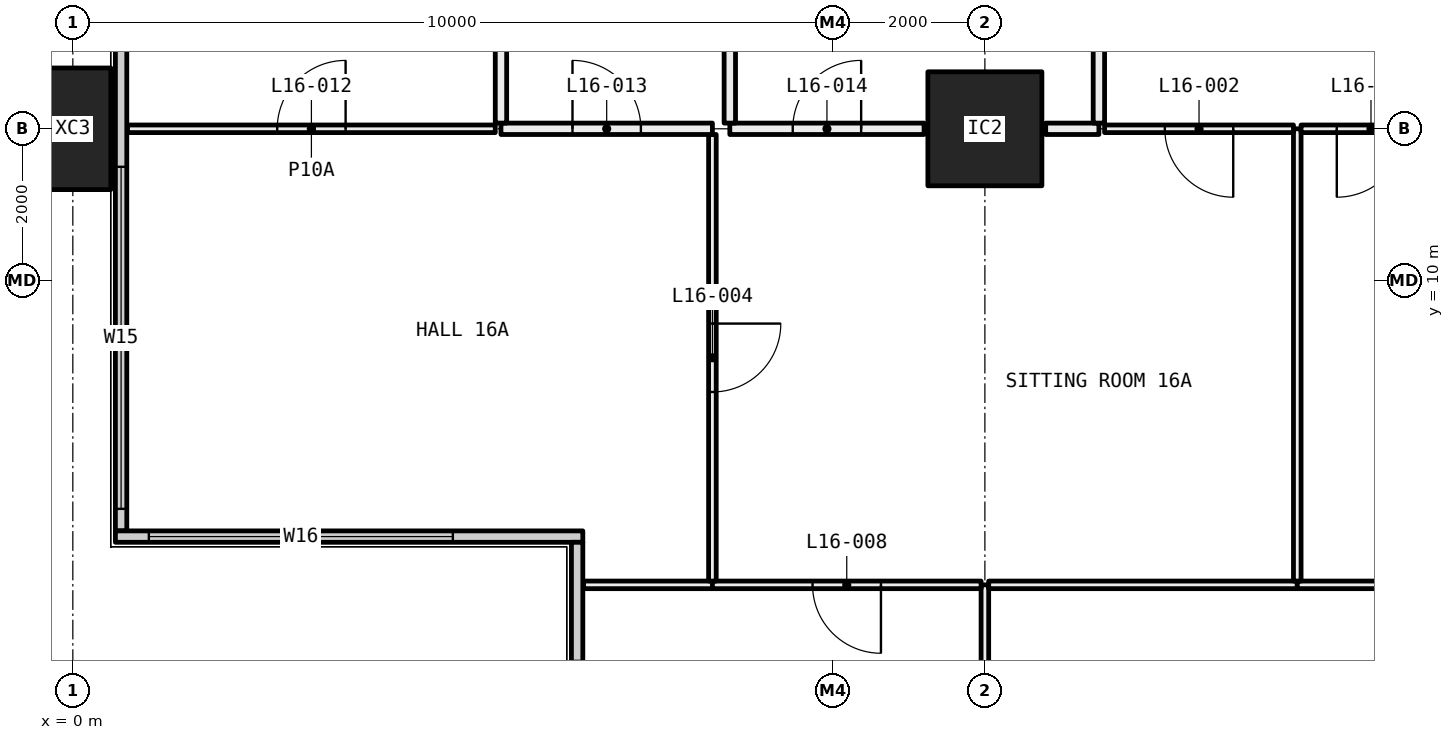
"""IFC4 building model, lengths in metres.
Left out: names, types, materials, properties, quantities, classifications, styles, units other than length and angle.
Written with IfcOpenShell. Run it as: python <this file> out.ifc"""

import sys

from ifc_helpers import new_model, si_unit, direction, frame, frame_2d, origin, origin_2d, place, context, subcontext, project, spatial, rectangle, hollow_rectangle, extrude, element, fill, save


model = new_model("IFC4")
c1 = context("Model", 3, precision=1e-05, world=origin(), true_north=direction((0.0, 1.0)))
c2 = subcontext(c1, "Body", "Model", "MODEL_VIEW")
j1 = project(units=[si_unit("LENGTHUNIT", "METRE"), si_unit("PLANEANGLEUNIT", "RADIAN")], contexts=[c1])
p1 = place(None, origin())
s1 = spatial("IfcSite", under=j1, at=p1, CompositionType="ELEMENT")
p2 = place(p1, origin())
s2 = spatial("IfcBuilding", under=s1, at=p2, CompositionType="ELEMENT")
p3 = place(p2, frame((0.0, 0.0, 67.95)))
s3 = spatial("IfcBuildingStorey", under=s2, at=p3, CompositionType="ELEMENT", Elevation=67.95)
p4 = place(p3, frame((0.0, 12.0, -0.4), z_axis=(0.0, 0.0, 1.0), x_axis=(0.0, 1.0, 0.0)))
e1 = element("IfcColumn", 1, at=p4, inside=s3, PredefinedType="COLUMN", context=c2, shape_type="SweptSolid", body=[
    extrude(hollow_rectangle(XDim=1.6, YDim=1.0, WallThickness=0.065, at=origin_2d()), origin(), (0.0, 0.0, 1.0), 3.45),
])
p5 = place(p3, frame((12.0, 12.0, 0.0), z_axis=(0.0, 0.0, 1.0), x_axis=(1.0, 0.0, 0.0)))
e2 = element("IfcColumn", 2, at=p5, inside=s3, PredefinedType="COLUMN", context=c2, shape_type="SweptSolid", body=[
    extrude(hollow_rectangle(XDim=1.5, YDim=1.5, WallThickness=0.065, at=origin_2d()), origin(), (0.0, 0.0, 1.0), 3.05),
])
p6 = place(p3, frame((0.635, 6.71, 0.0), z_axis=(0.0, 0.0, 1.0), x_axis=(0.0, 1.0, 0.0)))
e3 = element("IfcWall", 3, at=p6, inside=s3, PredefinedType="ELEMENTEDWALL", context=c2, shape_type="SweptSolid", body=[
    extrude(rectangle(XDim=34.58, YDim=0.15, at=frame_2d((17.29, 0.0))), origin(), (0.0, 0.0, 1.0), 3.05),
])
p7 = place(p6, frame((0.29, 0.0, 0.45)))
e4 = element("IfcOpeningElement", 4, at=p7, cuts=e3, PredefinedType="OPENING", context=c2, shape_type="SweptSolid", body=[
    extrude(rectangle(XDim=4.5, YDim=2.55, at=frame_2d((2.25, 1.275))), frame((0.0, 0.085, 0.0), z_axis=(0.0, -1.0, 0.0), x_axis=(1.0, 0.0, 0.0)), (0.0, 0.0, 1.0), 0.17),
])
p8 = place(p6, frame((7.54, 0.0, 0.45)))
e5 = element("IfcOpeningElement", 5, at=p8, cuts=e3, PredefinedType="OPENING", context=c2, shape_type="SweptSolid", body=[
    extrude(rectangle(XDim=3.25, YDim=2.55, at=frame_2d((1.625, 1.275))), frame((0.0, 0.085, 0.0), z_axis=(0.0, -1.0, 0.0), x_axis=(1.0, 0.0, 0.0)), (0.0, 0.0, 1.0), 0.17),
])
p9 = place(p6, frame((11.79, 0.0, 0.45)))
e6 = element("IfcOpeningElement", 6, at=p9, cuts=e3, PredefinedType="OPENING", context=c2, shape_type="SweptSolid", body=[
    extrude(rectangle(XDim=3.25, YDim=2.55, at=frame_2d((1.625, 1.275))), frame((0.0, 0.085, 0.0), z_axis=(0.0, -1.0, 0.0), x_axis=(1.0, 0.0, 0.0)), (0.0, 0.0, 1.0), 0.17),
])
p10 = place(p6, frame((19.54, 0.0, 0.45)))
e7 = element("IfcOpeningElement", 7, at=p10, cuts=e3, PredefinedType="OPENING", context=c2, shape_type="SweptSolid", body=[
    extrude(rectangle(XDim=3.25, YDim=2.55, at=frame_2d((1.625, 1.275))), frame((0.0, 0.085, 0.0), z_axis=(0.0, -1.0, 0.0), x_axis=(1.0, 0.0, 0.0)), (0.0, 0.0, 1.0), 0.17),
])
p11 = place(p6, frame((23.79, 0.0, 0.45)))
e8 = element("IfcOpeningElement", 8, at=p11, cuts=e3, PredefinedType="OPENING", context=c2, shape_type="SweptSolid", body=[
    extrude(rectangle(XDim=2.0, YDim=2.55, at=frame_2d((1.0, 1.275))), frame((0.0, 0.085, 0.0), z_axis=(0.0, -1.0, 0.0), x_axis=(1.0, 0.0, 0.0)), (0.0, 0.0, 1.0), 0.17),
])
p12 = place(p6, frame((29.79, 0.0, 0.45)))
e9 = element("IfcOpeningElement", 9, at=p12, cuts=e3, PredefinedType="OPENING", context=c2, shape_type="SweptSolid", body=[
    extrude(rectangle(XDim=4.5, YDim=2.55, at=frame_2d((2.25, 1.275))), frame((0.0, 0.085, 0.0), z_axis=(0.0, -1.0, 0.0), x_axis=(1.0, 0.0, 0.0)), (0.0, 0.0, 1.0), 0.17),
])
p13 = place(p3, frame((0.56, 6.635, 0.0), z_axis=(0.0, 0.0, 1.0), x_axis=(1.0, 0.0, 0.0)))
e10 = element("IfcWall", 10, at=p13, inside=s3, PredefinedType="ELEMENTEDWALL", context=c2, shape_type="SweptSolid", body=[
    extrude(rectangle(XDim=6.15, YDim=0.15, at=frame_2d((3.075, 0.0))), origin(), (0.0, 0.0, 1.0), 3.05),
])
p14 = place(p13, frame((0.44, 0.0, 0.45)))
e11 = element("IfcOpeningElement", 11, at=p14, cuts=e10, PredefinedType="OPENING", context=c2, shape_type="SweptSolid", body=[
    extrude(rectangle(XDim=4.0, YDim=2.55, at=frame_2d((2.0, 1.275))), frame((0.0, 0.085, 0.0), z_axis=(0.0, -1.0, 0.0), x_axis=(1.0, 0.0, 0.0)), (0.0, 0.0, 1.0), 0.17),
])
p15 = place(p3, frame((6.635, 0.71, 0.0), z_axis=(0.0, 0.0, 1.0), x_axis=(0.0, 1.0, 0.0)))
e12 = element("IfcWall", 12, at=p15, inside=s3, PredefinedType="ELEMENTEDWALL", context=c2, shape_type="SweptSolid", body=[
    extrude(rectangle(XDim=5.85, YDim=0.15, at=frame_2d((2.925, 0.0))), origin(), (0.0, 0.0, 1.0), 3.05),
])
p16 = place(p15, frame((0.29, 0.0, 0.45)))
e13 = element("IfcOpeningElement", 13, at=p16, cuts=e12, PredefinedType="OPENING", context=c2, shape_type="SweptSolid", body=[
    extrude(rectangle(XDim=4.0, YDim=2.55, at=frame_2d((2.0, 1.275))), frame((0.0, 0.085, 0.0), z_axis=(0.0, -1.0, 0.0), x_axis=(1.0, 0.0, 0.0)), (0.0, 0.0, 1.0), 0.17),
])
p17 = place(p3, frame((12.0, 0.72, 0.0), z_axis=(0.0, 0.0, 1.0), x_axis=(0.0, 1.0, 0.0)))
e14 = element("IfcWall", 14, at=p17, inside=s3, PredefinedType="PARTITIONING", context=c2, shape_type="SweptSolid", body=[
    extrude(rectangle(XDim=5.28, YDim=0.1, at=frame_2d((2.64, 0.0))), origin(), (0.0, 0.0, 1.0), 2.45),
])
p18 = place(p3, frame((8.415, 6.0, 0.0), z_axis=(0.0, 0.0, 1.0), x_axis=(-1.0, 0.0, 0.0)))
e15 = element("IfcWall", 15, at=p18, inside=s3, PredefinedType="PARTITIONING", context=c2, shape_type="SweptSolid", body=[
    extrude(rectangle(XDim=1.695, YDim=0.1, at=frame_2d((0.848, 0.0))), origin(), (0.0, 0.0, 1.0), 3.05),
])
p19 = place(p3, frame((11.95, 6.0, 0.0), z_axis=(0.0, 0.0, 1.0), x_axis=(-1.0, 0.0, 0.0)))
e16 = element("IfcWall", 16, at=p19, inside=s3, PredefinedType="PARTITIONING", context=c2, shape_type="SweptSolid", body=[
    extrude(rectangle(XDim=3.535, YDim=0.1, at=frame_2d((1.768, 0.0))), origin(), (0.0, 0.0, 1.0), 2.45),
])
p20 = place(p19, frame((1.317, 0.0, 0.0)))
e17 = element("IfcOpeningElement", 17, at=p20, cuts=e16, PredefinedType="OPENING", context=c2, shape_type="SweptSolid", body=[
    extrude(rectangle(XDim=0.9, YDim=2.1, at=frame_2d((0.45, 1.05))), frame((0.0, 0.06, 0.0), z_axis=(0.0, -1.0, 0.0), x_axis=(1.0, 0.0, 0.0)), (0.0, 0.0, 1.0), 0.12),
])
p21 = place(p3, frame((16.11, 6.0, 0.0), z_axis=(0.0, 0.0, 1.0), x_axis=(-1.0, 0.0, 0.0)))
e18 = element("IfcWall", 18, at=p21, inside=s3, PredefinedType="PARTITIONING", context=c2, shape_type="SweptSolid", body=[
    extrude(rectangle(XDim=4.06, YDim=0.1, at=frame_2d((2.03, 0.0))), origin(), (0.0, 0.0, 1.0), 2.45),
])
p22 = place(p3, frame((17.95, 6.0, 0.0), z_axis=(0.0, 0.0, 1.0), x_axis=(-1.0, 0.0, 0.0)))
e19 = element("IfcWall", 19, at=p22, inside=s3, PredefinedType="PARTITIONING", context=c2, shape_type="SweptSolid", body=[
    extrude(rectangle(XDim=1.84, YDim=0.1, at=frame_2d((0.92, 0.0))), origin(), (0.0, 0.0, 1.0), 3.05),
])
p23 = place(p3, frame((8.415, 6.05, 0.0), z_axis=(0.0, 0.0, 1.0), x_axis=(0.0, 1.0, 0.0)))
e20 = element("IfcWall", 20, at=p23, inside=s3, PredefinedType="PARTITIONING", context=c2, shape_type="SweptSolid", body=[
    extrude(rectangle(XDim=5.875, YDim=0.1, at=frame_2d((2.938, 0.0))), origin(), (0.0, 0.0, 1.0), 2.45),
])
p24 = place(p23, frame((2.488, 0.0, 0.0)))
e21 = element("IfcOpeningElement", 21, at=p24, cuts=e20, PredefinedType="OPENING", context=c2, shape_type="SweptSolid", body=[
    extrude(rectangle(XDim=0.9, YDim=2.1, at=frame_2d((0.45, 1.05))), frame((0.0, 0.06, 0.0), z_axis=(0.0, -1.0, 0.0), x_axis=(1.0, 0.0, 0.0)), (0.0, 0.0, 1.0), 0.12),
])
p25 = place(p3, frame((5.558, 12.0, 0.0), z_axis=(0.0, 0.0, 1.0), x_axis=(-1.0, 0.0, 0.0)))
e22 = element("IfcWall", 22, at=p25, inside=s3, PredefinedType="PARTITIONING", context=c2, shape_type="SweptSolid", body=[
    extrude(rectangle(XDim=4.838, YDim=0.1, at=frame_2d((2.419, 0.0))), origin(), (0.0, 0.0, 1.0), 2.45),
])
p26 = place(p25, frame((1.969, 0.0, 0.0)))
e23 = element("IfcOpeningElement", 23, at=p26, cuts=e22, PredefinedType="OPENING", context=c2, shape_type="SweptSolid", body=[
    extrude(rectangle(XDim=0.9, YDim=2.1, at=frame_2d((0.45, 1.05))), frame((0.0, 0.06, 0.0), z_axis=(0.0, -1.0, 0.0), x_axis=(1.0, 0.0, 0.0)), (0.0, 0.0, 1.0), 0.12),
])
p27 = place(p3, frame((8.415, 12.0, 0.0), z_axis=(0.0, 0.0, 1.0), x_axis=(-1.0, 0.0, 0.0)))
e24 = element("IfcWall", 24, at=p27, inside=s3, PredefinedType="PARTITIONING", context=c2, shape_type="SweptSolid", body=[
    extrude(rectangle(XDim=2.782, YDim=0.15, at=frame_2d((1.391, 0.0))), origin(), (0.0, 0.0, 1.0), 2.45),
])
p28 = place(p27, frame((0.941, 0.0, 0.0)))
e25 = element("IfcOpeningElement", 25, at=p28, cuts=e24, PredefinedType="OPENING", context=c2, shape_type="SweptSolid", body=[
    extrude(rectangle(XDim=0.9, YDim=2.1, at=frame_2d((0.45, 1.05))), frame((0.0, 0.085, 0.0), z_axis=(0.0, -1.0, 0.0), x_axis=(1.0, 0.0, 0.0)), (0.0, 0.0, 1.0), 0.17),
])
p29 = place(p3, frame((16.11, 6.05, 0.0), z_axis=(0.0, 0.0, 1.0), x_axis=(0.0, 1.0, 0.0)))
e26 = element("IfcWall", 26, at=p29, inside=s3, PredefinedType="PARTITIONING", context=c2, shape_type="SweptSolid", body=[
    extrude(rectangle(XDim=5.95, YDim=0.1, at=frame_2d((2.975, 0.0))), origin(), (0.0, 0.0, 1.0), 2.45),
])
p30 = place(p3, frame((11.2, 12.0, 0.0), z_axis=(0.0, 0.0, 1.0), x_axis=(-1.0, 0.0, 0.0)))
e27 = element("IfcWall", 27, at=p30, inside=s3, PredefinedType="PARTITIONING", context=c2, shape_type="SweptSolid", body=[
    extrude(rectangle(XDim=2.556, YDim=0.15, at=frame_2d((1.278, 0.0))), origin(), (0.0, 0.0, 1.0), 2.45),
])
p31 = place(p30, frame((0.828, 0.0, 0.0)))
e28 = element("IfcOpeningElement", 28, at=p31, cuts=e27, PredefinedType="OPENING", context=c2, shape_type="SweptSolid", body=[
    extrude(rectangle(XDim=0.9, YDim=2.1, at=frame_2d((0.45, 1.05))), frame((0.0, 0.085, 0.0), z_axis=(0.0, -1.0, 0.0), x_axis=(1.0, 0.0, 0.0)), (0.0, 0.0, 1.0), 0.17),
])
p32 = place(p3, frame((13.5, 12.0, 0.0), z_axis=(0.0, 0.0, 1.0), x_axis=(-1.0, 0.0, 0.0)))
e29 = element("IfcWall", 29, at=p32, inside=s3, PredefinedType="PARTITIONING", context=c2, shape_type="SweptSolid", body=[
    extrude(rectangle(XDim=0.7, YDim=0.15, at=frame_2d((0.35, 0.0))), origin(), (0.0, 0.0, 1.0), 2.45),
])
p33 = place(p3, frame((16.06, 12.0, 0.0), z_axis=(0.0, 0.0, 1.0), x_axis=(-1.0, 0.0, 0.0)))
e30 = element("IfcWall", 30, at=p33, inside=s3, PredefinedType="PARTITIONING", context=c2, shape_type="SweptSolid", body=[
    extrude(rectangle(XDim=2.485, YDim=0.1, at=frame_2d((1.243, 0.0))), origin(), (0.0, 0.0, 1.0), 2.45),
])
p34 = place(p33, frame((0.792, 0.0, 0.0)))
e31 = element("IfcOpeningElement", 31, at=p34, cuts=e30, PredefinedType="OPENING", context=c2, shape_type="SweptSolid", body=[
    extrude(rectangle(XDim=0.9, YDim=2.1, at=frame_2d((0.45, 1.05))), frame((0.0, 0.06, 0.0), z_axis=(0.0, -1.0, 0.0), x_axis=(1.0, 0.0, 0.0)), (0.0, 0.0, 1.0), 0.12),
])
p35 = place(p3, frame((18.0, 12.0, 0.0), z_axis=(0.0, 0.0, 1.0), x_axis=(-1.0, 0.0, 0.0)))
e32 = element("IfcWall", 32, at=p35, inside=s3, PredefinedType="PARTITIONING", context=c2, shape_type="SweptSolid", body=[
    extrude(rectangle(XDim=1.84, YDim=0.1, at=frame_2d((0.92, 0.0))), origin(), (0.0, 0.0, 1.0), 2.45),
])
p36 = place(p35, frame((0.47, 0.0, 0.0)))
e33 = element("IfcOpeningElement", 33, at=p36, cuts=e32, PredefinedType="OPENING", context=c2, shape_type="SweptSolid", body=[
    extrude(rectangle(XDim=0.9, YDim=2.1, at=frame_2d((0.45, 1.05))), frame((0.0, 0.06, 0.0), z_axis=(0.0, -1.0, 0.0), x_axis=(1.0, 0.0, 0.0)), (0.0, 0.0, 1.0), 0.12),
])
p37 = place(p3, frame((5.633, 12.075, 0.0), z_axis=(0.0, 0.0, 1.0), x_axis=(0.0, 1.0, 0.0)))
e34 = element("IfcWall", 34, at=p37, inside=s3, PredefinedType="PARTITIONING", context=c2, shape_type="SweptSolid", body=[
    extrude(rectangle(XDim=3.91, YDim=0.15, at=frame_2d((1.955, 0.0))), origin(), (0.0, 0.0, 1.0), 2.45),
])
p38 = place(p3, frame((8.644, 12.075, 0.0), z_axis=(0.0, 0.0, 1.0), x_axis=(0.0, 1.0, 0.0)))
e35 = element("IfcWall", 35, at=p38, inside=s3, PredefinedType="PARTITIONING", context=c2, shape_type="SweptSolid", body=[
    extrude(rectangle(XDim=2.396, YDim=0.15, at=frame_2d((1.198, 0.0))), origin(), (0.0, 0.0, 1.0), 2.45),
])
p39 = place(p3, frame((13.5, 12.075, 0.0), z_axis=(0.0, 0.0, 1.0), x_axis=(0.0, 1.0, 0.0)))
e36 = element("IfcWall", 36, at=p39, inside=s3, PredefinedType="PARTITIONING", context=c2, shape_type="SweptSolid", body=[
    extrude(rectangle(XDim=2.321, YDim=0.15, at=frame_2d((1.161, 0.0))), origin(), (0.0, 0.0, 1.0), 2.45),
])
p40 = place(p7, origin())
e37 = element("IfcWindow", 37, at=p40, inside=s3, PartitioningType="SINGLE_PANEL", PredefinedType="WINDOW", context=c2, shape_type="SweptSolid", body=[
    extrude(rectangle(XDim=4.5, YDim=2.55, at=frame_2d((2.25, 1.275))), frame((0.0, 0.03, 0.0), z_axis=(0.0, -1.0, 0.0), x_axis=(1.0, 0.0, 0.0)), (0.0, 0.0, 1.0), 0.06),
])
fill(e4, e37)
p41 = place(p14, origin())
e38 = element("IfcWindow", 38, at=p41, inside=s3, PartitioningType="SINGLE_PANEL", PredefinedType="WINDOW", context=c2, shape_type="SweptSolid", body=[
    extrude(rectangle(XDim=4.0, YDim=2.55, at=frame_2d((2.0, 1.275))), frame((0.0, 0.03, 0.0), z_axis=(0.0, -1.0, 0.0), x_axis=(1.0, 0.0, 0.0)), (0.0, 0.0, 1.0), 0.06),
])
fill(e11, e38)
p42 = place(p34, origin())
e39 = element("IfcDoor", 39, at=p42, inside=s3, OperationType="SINGLE_SWING_RIGHT", PredefinedType="DOOR", context=c2, shape_type="SweptSolid", body=[
    extrude(rectangle(XDim=0.9, YDim=2.1, at=frame_2d((0.45, 1.05))), frame((0.0, 0.025, 0.0), z_axis=(0.0, -1.0, 0.0), x_axis=(1.0, 0.0, 0.0)), (0.0, 0.0, 1.0), 0.05),
])
fill(e31, e39)
p43 = place(p36, origin())
e40 = element("IfcDoor", 40, at=p43, inside=s3, OperationType="SINGLE_SWING_LEFT", PredefinedType="DOOR", context=c2, shape_type="SweptSolid", body=[
    extrude(rectangle(XDim=0.9, YDim=2.1, at=frame_2d((0.45, 1.05))), frame((0.0, 0.025, 0.0), z_axis=(0.0, -1.0, 0.0), x_axis=(1.0, 0.0, 0.0)), (0.0, 0.0, 1.0), 0.05),
])
fill(e33, e40)
p44 = place(p24, frame((0.9, 0.0, 0.0), x_axis=(-1.0, 0.0, 0.0)))
e41 = element("IfcDoor", 41, at=p44, inside=s3, OperationType="SINGLE_SWING_RIGHT", PredefinedType="DOOR", context=c2, shape_type="SweptSolid", body=[
    extrude(rectangle(XDim=0.9, YDim=2.1, at=frame_2d((0.45, 1.05))), frame((0.0, 0.025, 0.0), z_axis=(0.0, -1.0, 0.0), x_axis=(1.0, 0.0, 0.0)), (0.0, 0.0, 1.0), 0.05),
])
fill(e21, e41)
p45 = place(p20, origin())
e42 = element("IfcDoor", 42, at=p45, inside=s3, OperationType="SINGLE_SWING_RIGHT", PredefinedType="DOOR", context=c2, shape_type="SweptSolid", body=[
    extrude(rectangle(XDim=0.9, YDim=2.1, at=frame_2d((0.45, 1.05))), frame((0.0, 0.025, 0.0), z_axis=(0.0, -1.0, 0.0), x_axis=(1.0, 0.0, 0.0)), (0.0, 0.0, 1.0), 0.05),
])
fill(e17, e42)
p46 = place(p26, frame((0.9, 0.0, 0.0), x_axis=(-1.0, 0.0, 0.0)))
e43 = element("IfcDoor", 43, at=p46, inside=s3, OperationType="SINGLE_SWING_LEFT", PredefinedType="DOOR", context=c2, shape_type="SweptSolid", body=[
    extrude(rectangle(XDim=0.9, YDim=2.1, at=frame_2d((0.45, 1.05))), frame((0.0, 0.025, 0.0), z_axis=(0.0, -1.0, 0.0), x_axis=(1.0, 0.0, 0.0)), (0.0, 0.0, 1.0), 0.05),
])
fill(e23, e43)
p47 = place(p28, frame((0.9, 0.0, 0.0), x_axis=(-1.0, 0.0, 0.0)))
e44 = element("IfcDoor", 44, at=p47, inside=s3, OperationType="SINGLE_SWING_RIGHT", PredefinedType="DOOR", context=c2, shape_type="SweptSolid", body=[
    extrude(rectangle(XDim=0.9, YDim=2.1, at=frame_2d((0.45, 1.05))), frame((0.0, 0.025, 0.0), z_axis=(0.0, -1.0, 0.0), x_axis=(1.0, 0.0, 0.0)), (0.0, 0.0, 1.0), 0.05),
])
fill(e25, e44)
p48 = place(p31, frame((0.9, 0.0, 0.0), x_axis=(-1.0, 0.0, 0.0)))
e45 = element("IfcDoor", 45, at=p48, inside=s3, OperationType="SINGLE_SWING_LEFT", PredefinedType="DOOR", context=c2, shape_type="SweptSolid", body=[
    extrude(rectangle(XDim=0.9, YDim=2.1, at=frame_2d((0.45, 1.05))), frame((0.0, 0.025, 0.0), z_axis=(0.0, -1.0, 0.0), x_axis=(1.0, 0.0, 0.0)), (0.0, 0.0, 1.0), 0.05),
])
fill(e28, e45)
save(model, sys.argv[1])
